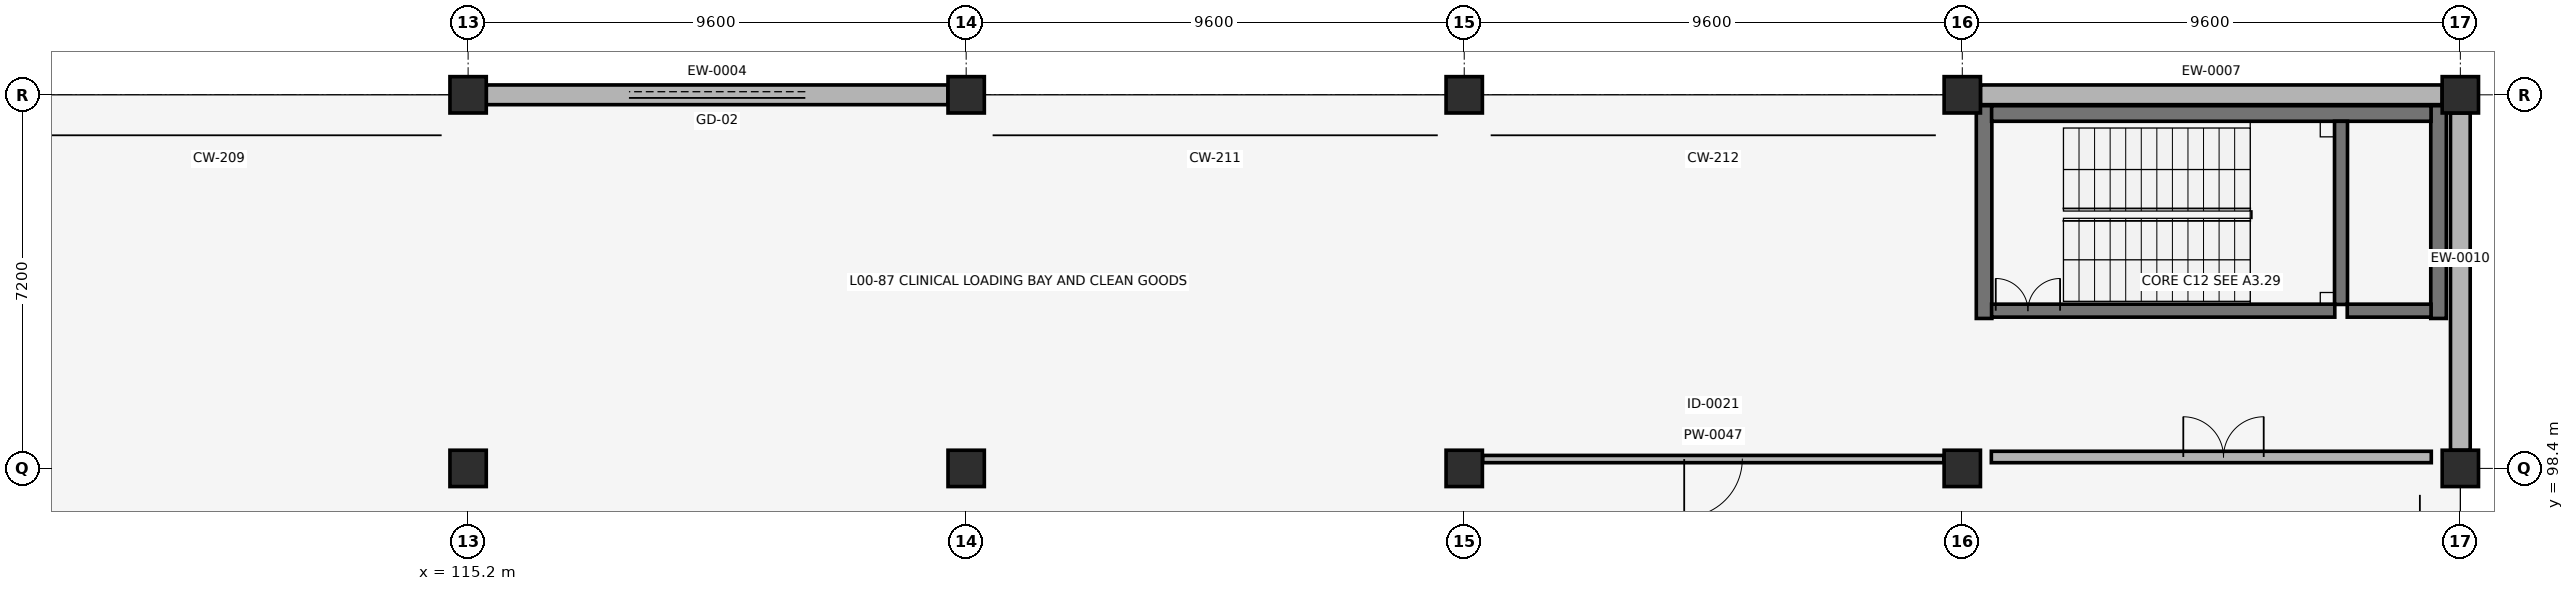
"""IFC4 building model, lengths in metres.
Left out: names, types, materials, properties, quantities, classifications, styles, units other than length and angle.
Written with IfcOpenShell. Run it as: python <this file> out.ifc"""

import sys

from ifc_helpers import new_model, si_unit, direction, frame, frame_2d, origin, origin_2d, place, context, subcontext, project, spatial, rectangle, circle, extrude, element, fill, save


model = new_model("IFC4")
c1 = context("Model", 3, precision=1e-05, world=origin(), true_north=direction((0.0, 1.0)))
c2 = subcontext(c1, "Body", "Model", "MODEL_VIEW")
j1 = project(units=[si_unit("LENGTHUNIT", "METRE"), si_unit("PLANEANGLEUNIT", "RADIAN")], contexts=[c1])
p1 = place(None, origin())
s1 = spatial("IfcSite", under=j1, at=p1, CompositionType="ELEMENT")
p2 = place(p1, origin())
s2 = spatial("IfcBuilding", under=s1, at=p2, CompositionType="ELEMENT")
p3 = place(p2, origin())
s3 = spatial("IfcBuildingStorey", under=s2, at=p3, CompositionType="ELEMENT", Elevation=0.0)
for number, where, z_axis, x_axis in (
    (1, (115.2, 98.4, -0.44), (0.0, 0.0, 1.0), (1.0, 0.0, 0.0)),
    (2, (115.2, 105.6, -0.44), (0.0, 0.0, 1.0), (1.0, 0.0, 0.0)),
    (3, (124.8, 98.4, -0.44), (0.0, 0.0, 1.0), (1.0, 0.0, 0.0)),
    (4, (124.8, 105.6, -0.44), (0.0, 0.0, 1.0), (1.0, 0.0, 0.0)),
    (5, (134.4, 98.4, -0.44), (0.0, 0.0, 1.0), (1.0, 0.0, 0.0)),
    (6, (134.4, 105.6, -0.44), (0.0, 0.0, 1.0), (1.0, 0.0, 0.0)),
    (7, (144.0, 98.4, -0.44), (0.0, 0.0, 1.0), (1.0, 0.0, 0.0)),
    (8, (144.0, 105.6, -0.44), (0.0, 0.0, 1.0), (1.0, 0.0, 0.0)),
    (9, (153.6, 98.4, -0.44), (0.0, 0.0, 1.0), (1.0, 0.0, 0.0)),
    (10, (153.6, 105.6, -0.44), (0.0, 0.0, 1.0), (1.0, 0.0, 0.0)),
):
    element("IfcColumn", number, at=place(p3, frame(where, z_axis=z_axis, x_axis=x_axis)), inside=s3, PredefinedType="COLUMN", context=c2, shape_type="SweptSolid", body=[
        extrude(circle(Radius=0.35, at=origin_2d()), origin(), (0.0, 0.0, 1.0), 4.86),
    ])
p4 = place(p3, frame((124.45, 105.6, 0.0), z_axis=(0.0, 0.0, 1.0), x_axis=(-1.0, 0.0, 0.0)))
e11 = element("IfcWall", 11, at=p4, inside=s3, PredefinedType="SOLIDWALL", context=c2, shape_type="SweptSolid", body=[
    extrude(rectangle(XDim=8.9, YDim=0.38, at=frame_2d((4.45, 0.0))), origin(), (0.0, 0.0, 1.0), 3.37),
])
p5 = place(p4, frame((2.75, 0.0, 0.0)))
e12 = element("IfcOpeningElement", 12, at=p5, cuts=e11, PredefinedType="OPENING", context=c2, shape_type="SweptSolid", body=[
    extrude(rectangle(XDim=3.4, YDim=2.55, at=frame_2d((1.7, 1.275))), frame((0.0, 0.2, 0.0), z_axis=(0.0, -1.0, 0.0), x_axis=(1.0, 0.0, 0.0)), (0.0, 0.0, 1.0), 0.4),
])
p6 = place(p3, frame((153.25, 105.6, 0.0), z_axis=(0.0, 0.0, 1.0), x_axis=(-1.0, 0.0, 0.0)))
e13 = element("IfcWall", 13, at=p6, inside=s3, PredefinedType="SOLIDWALL", context=c2, shape_type="SweptSolid", body=[
    extrude(rectangle(XDim=8.9, YDim=0.38, at=frame_2d((4.45, 0.0))), origin(), (0.0, 0.0, 1.0), 3.37),
])
p7 = place(p3, frame((153.6, 98.75, 0.0), z_axis=(0.0, 0.0, 1.0), x_axis=(0.0, 1.0, 0.0)))
e14 = element("IfcWall", 14, at=p7, inside=s3, PredefinedType="SOLIDWALL", context=c2, shape_type="SweptSolid", body=[
    extrude(rectangle(XDim=6.5, YDim=0.38, at=frame_2d((3.25, 0.0))), origin(), (0.0, 0.0, 1.0), 3.37),
])
for number, where, z_axis, x_axis in (
    (15, (144.42, 101.29, 0.0), (0.0, 0.0, 1.0), (0.0, 1.0, 0.0)),
    (16, (153.18, 101.29, 0.0), (0.0, 0.0, 1.0), (0.0, 1.0, 0.0)),
):
    element("IfcWall", number, at=place(p3, frame(where, z_axis=z_axis, x_axis=x_axis)), inside=s3, PredefinedType="SHEAR", context=c2, shape_type="SweptSolid", body=[
        extrude(rectangle(XDim=4.1, YDim=0.3, at=frame_2d((2.05, 0.0))), origin(), (0.0, 0.0, 1.0), 4.14),
    ])
p8 = place(p3, frame((144.565, 105.24, 0.0), z_axis=(0.0, 0.0, 1.0), x_axis=(1.0, 0.0, 0.0)))
e17 = element("IfcWall", 17, at=p8, inside=s3, PredefinedType="SHEAR", context=c2, shape_type="SweptSolid", body=[
    extrude(rectangle(XDim=8.47, YDim=0.3, at=frame_2d((4.235, 0.0))), origin(), (0.0, 0.0, 1.0), 4.14),
])
p9 = place(p3, frame((151.3, 101.56, 0.0), z_axis=(0.0, 0.0, 1.0), x_axis=(0.0, 1.0, 0.0)))
e18 = element("IfcWall", 18, at=p9, inside=s3, PredefinedType="SHEAR", context=c2, shape_type="SweptSolid", body=[
    extrude(rectangle(XDim=3.53, YDim=0.25, at=frame_2d((1.765, 0.0))), origin(), (0.0, 0.0, 1.0), 4.14),
])
p10 = place(p3, frame((144.565, 101.44, 0.0), z_axis=(0.0, 0.0, 1.0), x_axis=(1.0, 0.0, 0.0)))
e19 = element("IfcWall", 19, at=p10, inside=s3, PredefinedType="SHEAR", context=c2, shape_type="SweptSolid", body=[
    extrude(rectangle(XDim=6.615, YDim=0.25, at=frame_2d((3.308, 0.0))), origin(), (0.0, 0.0, 1.0), 4.14),
])
p11 = place(p10, frame((0.08, 0.0, 0.0)))
e20 = element("IfcOpeningElement", 20, at=p11, cuts=e19, PredefinedType="OPENING", context=c2, shape_type="SweptSolid", body=[
    extrude(rectangle(XDim=1.24, YDim=2.15, at=frame_2d((0.62, 1.075))), frame((0.0, 0.135, 0.0), z_axis=(0.0, -1.0, 0.0), x_axis=(1.0, 0.0, 0.0)), (0.0, 0.0, 1.0), 0.27),
])
p12 = place(p3, frame((144.56, 98.62, 0.0), z_axis=(0.0, 0.0, 1.0), x_axis=(1.0, 0.0, 0.0)))
e21 = element("IfcWall", 21, at=p12, inside=s3, PredefinedType="PARTITIONING", context=c2, shape_type="SweptSolid", body=[
    extrude(rectangle(XDim=8.48, YDim=0.22, at=frame_2d((4.24, 0.0))), origin(), (0.0, 0.0, 1.0), 3.42),
])
p13 = place(p12, frame((3.7, 0.0, 0.0)))
e22 = element("IfcOpeningElement", 22, at=p13, cuts=e21, PredefinedType="OPENING", context=c2, shape_type="SweptSolid", body=[
    extrude(rectangle(XDim=1.55, YDim=2.2, at=frame_2d((0.775, 1.1))), frame((0.0, 0.12, 0.0), z_axis=(0.0, -1.0, 0.0), x_axis=(1.0, 0.0, 0.0)), (0.0, 0.0, 1.0), 0.24),
])
p14 = place(p3, frame((151.42, 101.44, 0.0), z_axis=(0.0, 0.0, 1.0), x_axis=(1.0, 0.0, 0.0)))
e23 = element("IfcWall", 23, at=p14, inside=s3, PredefinedType="SHEAR", context=c2, shape_type="SweptSolid", body=[
    extrude(rectangle(XDim=1.615, YDim=0.25, at=frame_2d((0.808, 0.0))), origin(), (0.0, 0.0, 1.0), 4.14),
])
p15 = place(p3, frame((134.755, 98.58, 0.0), z_axis=(0.0, 0.0, 1.0), x_axis=(1.0, 0.0, 0.0)))
e24 = element("IfcWall", 24, at=p15, inside=s3, PredefinedType="PARTITIONING", context=c2, shape_type="SweptSolid", body=[
    extrude(rectangle(XDim=8.89, YDim=0.14, at=frame_2d((4.445, 0.0))), origin(), (0.0, 0.0, 1.0), 3.42),
])
p16 = place(p15, frame((3.885, 0.0, 0.0)))
e25 = element("IfcOpeningElement", 25, at=p16, cuts=e24, PredefinedType="OPENING", context=c2, shape_type="SweptSolid", body=[
    extrude(rectangle(XDim=1.12, YDim=2.1, at=frame_2d((0.56, 1.05))), frame((0.0, 0.08, 0.0), z_axis=(0.0, -1.0, 0.0), x_axis=(1.0, 0.0, 0.0)), (0.0, 0.0, 1.0), 0.16),
])
p17 = place(p5, origin())
e26 = element("IfcDoor", 26, at=p17, inside=s3, OperationType="ROLLINGUP", PredefinedType="GATE", context=c2, shape_type="SweptSolid", body=[
    extrude(rectangle(XDim=3.4, YDim=2.55, at=frame_2d((1.7, 1.275))), frame((0.0, 0.025, 0.0), z_axis=(0.0, -1.0, 0.0), x_axis=(1.0, 0.0, 0.0)), (0.0, 0.0, 1.0), 0.05),
])
fill(e12, e26)
p18 = place(p11, origin())
e27 = element("IfcDoor", 27, at=p18, inside=s3, OperationType="DOUBLE_DOOR_SINGLE_SWING", PredefinedType="DOOR", context=c2, shape_type="SweptSolid", body=[
    extrude(rectangle(XDim=1.24, YDim=2.15, at=frame_2d((0.62, 1.075))), frame((0.0, 0.025, 0.0), z_axis=(0.0, -1.0, 0.0), x_axis=(1.0, 0.0, 0.0)), (0.0, 0.0, 1.0), 0.05),
])
fill(e20, e27)
p19 = place(p13, origin())
e28 = element("IfcDoor", 28, at=p19, inside=s3, OperationType="DOUBLE_DOOR_SINGLE_SWING", PredefinedType="DOOR", context=c2, shape_type="SweptSolid", body=[
    extrude(rectangle(XDim=1.55, YDim=2.2, at=frame_2d((0.775, 1.1))), frame((0.0, 0.025, 0.0), z_axis=(0.0, -1.0, 0.0), x_axis=(1.0, 0.0, 0.0)), (0.0, 0.0, 1.0), 0.05),
])
fill(e22, e28)
p20 = place(p16, origin())
e29 = element("IfcDoor", 29, at=p20, inside=s3, OperationType="SINGLE_SWING_RIGHT", PredefinedType="DOOR", context=c2, shape_type="SweptSolid", body=[
    extrude(rectangle(XDim=1.12, YDim=2.1, at=frame_2d((0.56, 1.05))), frame((0.0, 0.025, 0.0), z_axis=(0.0, -1.0, 0.0), x_axis=(1.0, 0.0, 0.0)), (0.0, 0.0, 1.0), 0.05),
])
fill(e25, e29)
save(model, sys.argv[1])
